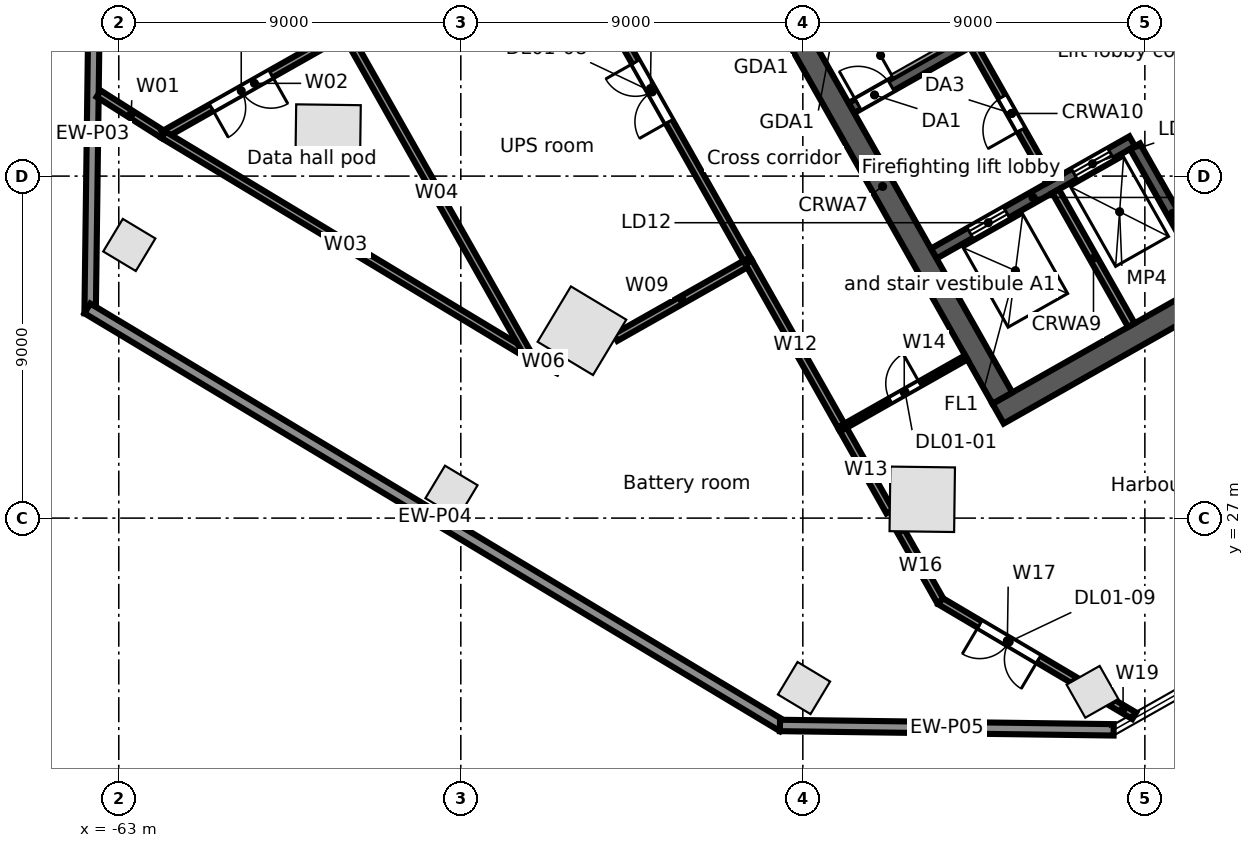
"""IFC4 building model, lengths in metres.
Left out: names, types, materials, properties, quantities, classifications, styles, units other than length and angle.
Written with IfcOpenShell. Run it as: python <this file> out.ifc"""

import sys

from ifc_helpers import new_model, si_unit, direction, frame, frame_2d, origin, origin_2d, place, context, subcontext, project, spatial, rectangle, extrude, element, fill, save


model = new_model("IFC4")
c1 = context("Model", 3, precision=1e-05, world=origin(), true_north=direction((0.0, 1.0)))
c2 = subcontext(c1, "Body", "Model", "MODEL_VIEW")
j1 = project(units=[si_unit("LENGTHUNIT", "METRE"), si_unit("PLANEANGLEUNIT", "RADIAN")], contexts=[c1])
p1 = place(None, origin())
s1 = spatial("IfcSite", under=j1, at=p1, CompositionType="ELEMENT")
p2 = place(p1, origin())
s2 = spatial("IfcBuilding", under=s1, at=p2, CompositionType="ELEMENT")
p3 = place(p2, frame((0.0, 0.0, 6.5)))
s3 = spatial("IfcBuildingStorey", under=s2, at=p3, CompositionType="ELEMENT", Elevation=6.5)
for number, where, z_axis, x_axis in (
    (1, (-57.493, 37.027, 0.0), (0.0, 0.0, 1.0), (-0.013, -1.0, 0.0)),
    (2, (-50.812, 31.931, 0.0), (0.0, 0.0, 1.0), (0.857, -0.515, 0.0)),
    (3, (-41.858, 27.495, 0.0), (0.0, 0.0, 1.0), (1.0, -0.013, 0.0)),
):
    element("IfcColumn", number, at=place(p3, frame(where, z_axis=z_axis, x_axis=x_axis)), inside=s3, PredefinedType="COLUMN", context=c2, shape_type="SweptSolid", body=[
        extrude(rectangle(XDim=1.7, YDim=1.7, at=origin_2d()), origin(), (0.0, 0.0, 1.0), 5.0),
    ])
for number, where, z_axis, x_axis in (
    (4, (-62.723, 34.188, 0.0), (0.0, 0.0, 1.0), (0.857, -0.515, 0.0)),
    (5, (-54.245, 27.694, 0.0), (0.0, 0.0, 1.0), (0.857, -0.515, 0.0)),
    (6, (-44.969, 22.528, 0.0), (0.0, 0.0, 1.0), (0.857, -0.515, 0.0)),
    (7, (-37.378, 22.429, 0.0), (0.0, 0.0, 1.0), (0.87, 0.492, 0.0)),
):
    element("IfcColumn", number, at=place(p3, frame(where, z_axis=z_axis, x_axis=x_axis)), inside=s3, PredefinedType="COLUMN", context=c2, shape_type="SweptSolid", body=[
        extrude(rectangle(XDim=1.0, YDim=1.0, at=origin_2d()), origin(), (0.0, 0.0, 1.0), 5.0),
    ])
p4 = place(p3, frame((-63.754, 32.387, 0.0), z_axis=(0.0, 0.0, 1.0), x_axis=(0.013081929375, 0.999914427901, 0.0)))
e8 = element("IfcWall", 8, at=p4, inside=s3, PredefinedType="STANDARD", context=c2, shape_type="SweptSolid", body=[
    extrude(rectangle(XDim=9.443, YDim=0.3, at=frame_2d((4.722, 0.0))), origin(), (0.0, 0.0, 1.0), 4.65),
])
p5 = place(p3, frame((-45.526, 21.522, 0.0), z_axis=(0.0, 0.0, 1.0), x_axis=(-0.857164837164, 0.515042174903, 0.0)))
e9 = element("IfcWall", 9, at=p5, inside=s3, PredefinedType="STANDARD", context=c2, shape_type="SweptSolid", body=[
    extrude(rectangle(XDim=21.35, YDim=0.3, at=frame_2d((10.675, 0.0))), origin(), (0.0, 0.0, 1.0), 4.65),
])
p6 = place(p3, frame((-36.821, 21.428, 0.0), z_axis=(0.0, 0.0, 1.0), x_axis=(-0.999914252794, 0.013095306781, 0.0)))
e10 = element("IfcWall", 10, at=p6, inside=s3, PredefinedType="STANDARD", context=c2, shape_type="SweptSolid", body=[
    extrude(rectangle(XDim=8.781, YDim=0.3, at=frame_2d((4.391, 0.0))), origin(), (0.0, 0.0, 1.0), 4.65),
])
p7 = place(p3, frame((-39.862, 29.749, 0.0), z_axis=(0.0, 0.0, 1.0), x_axis=(0.870350116061, 0.492433422375, 0.0)))
e11 = element("IfcWall", 11, at=p7, inside=s3, PredefinedType="SOLIDWALL", context=c2, shape_type="SweptSolid", body=[
    extrude(rectangle(XDim=17.0, YDim=0.6, at=frame_2d((8.5, 0.0))), origin(), (0.0, 0.0, 1.0), 4.65),
])
p8 = place(p7, frame((7.2, 0.0, 0.0)))
e12 = element("IfcOpeningElement", 12, at=p8, cuts=e11, PredefinedType="OPENING", context=c2, shape_type="SweptSolid", body=[
    extrude(rectangle(XDim=1.2, YDim=2.1, at=frame_2d((0.6, 1.05))), frame((0.0, 0.31, 0.0), z_axis=(0.0, -1.0, 0.0), x_axis=(1.0, 0.0, 0.0)), (0.0, 0.0, 1.0), 0.62),
])
p9 = place(p3, frame((-41.556, 33.961, 0.0), z_axis=(0.0, 0.0, 1.0), x_axis=(0.870343731308, 0.492444706919, 0.0)))
e13 = element("IfcWall", 13, at=p9, inside=s3, PredefinedType="SOLIDWALL", context=c2, shape_type="SweptSolid", body=[
    extrude(rectangle(XDim=6.0, YDim=0.3, at=frame_2d((3.0, 0.0))), origin(), (0.0, 0.0, 1.0), 4.65),
])
p10 = place(p9, frame((1.1, 0.0, 0.0)))
e14 = element("IfcOpeningElement", 14, at=p10, cuts=e13, PredefinedType="OPENING", context=c2, shape_type="SweptSolid", body=[
    extrude(rectangle(XDim=1.1, YDim=2.1, at=frame_2d((0.55, 1.05))), frame((0.0, 0.16, 0.0), z_axis=(0.0, -1.0, 0.0), x_axis=(1.0, 0.0, 0.0)), (0.0, 0.0, 1.0), 0.32),
])
p11 = place(p9, frame((4.25, 0.0, 0.0)))
e15 = element("IfcOpeningElement", 15, at=p11, cuts=e13, PredefinedType="OPENING", context=c2, shape_type="SweptSolid", body=[
    extrude(rectangle(XDim=1.1, YDim=2.1, at=frame_2d((0.55, 1.05))), frame((0.0, 0.16, 0.0), z_axis=(0.0, -1.0, 0.0), x_axis=(1.0, 0.0, 0.0)), (0.0, 0.0, 1.0), 0.32),
])
p12 = place(p3, frame((-43.723, 37.791, 0.0), z_axis=(0.0, 0.0, 1.0), x_axis=(0.87035077051, 0.49243226567, 0.0)))
e16 = element("IfcWall", 16, at=p12, inside=s3, PredefinedType="SOLIDWALL", context=c2, shape_type="SweptSolid", body=[
    extrude(rectangle(XDim=7.4, YDim=0.3, at=frame_2d((3.7, 0.0))), origin(), (0.0, 0.0, 1.0), 4.65),
])
p13 = place(p12, frame((0.2, 0.0, 0.0)))
e17 = element("IfcOpeningElement", 17, at=p13, cuts=e16, PredefinedType="OPENING", context=c2, shape_type="SweptSolid", body=[
    extrude(rectangle(XDim=1.0, YDim=2.1, at=frame_2d((0.5, 1.05))), frame((0.0, 0.16, 0.0), z_axis=(0.0, -1.0, 0.0), x_axis=(1.0, 0.0, 0.0)), (0.0, 0.0, 1.0), 0.32),
])
p14 = place(p3, frame((-46.052, 41.298, 0.0), z_axis=(0.0, 0.0, 1.0), x_axis=(0.492418598281, -0.870358503186, 0.0)))
e18 = element("IfcWall", 18, at=p14, inside=s3, PredefinedType="SOLIDWALL", context=c2, shape_type="SweptSolid", body=[
    extrude(rectangle(XDim=12.8, YDim=0.6, at=frame_2d((6.4, 0.0))), origin(), (0.0, 0.0, 1.0), 4.65),
])
p15 = place(p3, frame((-38.349, 35.603, 0.0), z_axis=(0.0, 0.0, 1.0), x_axis=(0.49241474071, -0.870360685654, 0.0)))
e19 = element("IfcWall", 19, at=p15, inside=s3, PredefinedType="SOLIDWALL", context=c2, shape_type="SweptSolid", body=[
    extrude(rectangle(XDim=4.05, YDim=0.2, at=frame_2d((2.025, 0.0))), origin(), (0.0, 0.0, 1.0), 4.65),
])
p16 = place(p3, frame((-40.516, 39.433, 0.0), z_axis=(0.0, 0.0, 1.0), x_axis=(0.492453559952, -0.87033872216, 0.0)))
e20 = element("IfcWall", 20, at=p16, inside=s3, PredefinedType="PARTITIONING", context=c2, shape_type="SweptSolid", body=[
    extrude(rectangle(XDim=4.1, YDim=0.2, at=frame_2d((2.05, 0.0))), origin(), (0.0, 0.0, 1.0), 4.65),
])
p17 = place(p16, frame((1.55, 0.0, 0.0)))
e21 = element("IfcOpeningElement", 21, at=p17, cuts=e20, PredefinedType="OPENING", context=c2, shape_type="SweptSolid", body=[
    extrude(rectangle(XDim=1.0, YDim=2.1, at=frame_2d((0.5, 1.05))), frame((0.0, 0.11, 0.0), z_axis=(0.0, -1.0, 0.0), x_axis=(1.0, 0.0, 0.0)), (0.0, 0.0, 1.0), 0.22),
])
p18 = place(p3, frame((-36.26, 36.785, 0.0), z_axis=(0.0, 0.0, 1.0), x_axis=(0.492440575896, -0.870346068648, 0.0)))
e22 = element("IfcWall", 22, at=p18, inside=s3, PredefinedType="SOLIDWALL", context=c2, shape_type="SweptSolid", body=[
    extrude(rectangle(XDim=4.05, YDim=0.3, at=frame_2d((2.025, 0.0))), origin(), (0.0, 0.0, 1.0), 4.65),
])
p19 = place(p3, frame((-63.529, 38.167, 0.0), z_axis=(0.0, 0.0, 1.0), x_axis=(0.844913795328, -0.534902494352, 0.0)))
e23 = element("IfcWall", 23, at=p19, inside=s3, PredefinedType="PARTITIONING", context=c2, shape_type="SweptSolid", body=[
    extrude(rectangle(XDim=2.019, YDim=0.2, at=frame_2d((1.01, 0.0))), origin(), (0.0, 0.0, 1.0), 4.13),
])
p20 = place(p3, frame((-61.823, 37.087, 0.0), z_axis=(0.0, 0.0, 1.0), x_axis=(0.870387515286, 0.492367315359, 0.0)))
e24 = element("IfcWall", 24, at=p20, inside=s3, PredefinedType="PARTITIONING", context=c2, shape_type="SweptSolid", body=[
    extrude(rectangle(XDim=5.5, YDim=0.2, at=frame_2d((2.75, 0.0))), origin(), (0.0, 0.0, 1.0), 3.83),
])
p21 = place(p20, frame((1.45, 0.0, 0.0)))
e25 = element("IfcOpeningElement", 25, at=p21, cuts=e24, PredefinedType="OPENING", context=c2, shape_type="SweptSolid", body=[
    extrude(rectangle(XDim=1.8, YDim=2.1, at=frame_2d((0.9, 1.05))), frame((0.0, 0.11, 0.0), z_axis=(0.0, -1.0, 0.0), x_axis=(1.0, 0.0, 0.0)), (0.0, 0.0, 1.0), 0.22),
])
p22 = place(p3, frame((-61.823, 37.087, 0.0), z_axis=(0.0, 0.0, 1.0), x_axis=(0.85653126321, -0.516095141562, 0.0)))
e26 = element("IfcWall", 26, at=p22, inside=s3, PredefinedType="PARTITIONING", context=c2, shape_type="SweptSolid", body=[
    extrude(rectangle(XDim=11.195, YDim=0.2, at=frame_2d((5.598, 0.0))), origin(), (0.0, 0.0, 1.0), 3.822),
])
p23 = place(p3, frame((-57.036, 39.795, 0.0), z_axis=(0.0, 0.0, 1.0), x_axis=(0.492496959124, -0.870314164687, 0.0)))
e27 = element("IfcWall", 27, at=p23, inside=s3, PredefinedType="PARTITIONING", context=c2, shape_type="SweptSolid", body=[
    extrude(rectangle(XDim=9.75, YDim=0.2, at=frame_2d((4.875, 0.0))), origin(), (0.0, 0.0, 1.0), 3.822),
])
p24 = place(p3, frame((-52.234, 31.309, 0.0), z_axis=(0.0, 0.0, 1.0), x_axis=(0.89219447326, -0.451651438483, 0.0)))
e28 = element("IfcWall", 28, at=p24, inside=s3, PredefinedType="PARTITIONING", context=c2, shape_type="SweptSolid", body=[
    extrude(rectangle(XDim=0.901, YDim=0.2, at=frame_2d((0.451, 0.0))), origin(), (0.0, 0.0, 1.0), 3.712),
])
p25 = place(p3, frame((-51.596, 42.873, 0.0), z_axis=(0.0, 0.0, 1.0), x_axis=(0.492438738815, -0.870347108064, 0.0)))
e29 = element("IfcWall", 29, at=p25, inside=s3, PredefinedType="PARTITIONING", context=c2, shape_type="SweptSolid", body=[
    extrude(rectangle(XDim=10.5, YDim=0.2, at=frame_2d((5.25, 0.0))), origin(), (0.0, 0.0, 1.0), 3.712),
])
p26 = place(p25, frame((4.45, 0.0, 0.0)))
e30 = element("IfcOpeningElement", 30, at=p26, cuts=e29, PredefinedType="OPENING", context=c2, shape_type="SweptSolid", body=[
    extrude(rectangle(XDim=1.8, YDim=2.1, at=frame_2d((0.9, 1.05))), frame((0.0, 0.11, 0.0), z_axis=(0.0, -1.0, 0.0), x_axis=(1.0, 0.0, 0.0)), (0.0, 0.0, 1.0), 0.22),
])
p27 = place(p3, frame((-49.928, 31.752, 0.0), z_axis=(0.0, 0.0, 1.0), x_axis=(0.870348099826, 0.492436985948, 0.0)))
e31 = element("IfcWall", 31, at=p27, inside=s3, PredefinedType="PARTITIONING", context=c2, shape_type="SweptSolid", body=[
    extrude(rectangle(XDim=4.025, YDim=0.2, at=frame_2d((2.012, 0.0))), origin(), (0.0, 0.0, 1.0), 4.65),
])
p28 = place(p3, frame((-46.425, 33.734, 0.0), z_axis=(0.0, 0.0, 1.0), x_axis=(0.492427267353, -0.870353598469, 0.0)))
e32 = element("IfcWall", 32, at=p28, inside=s3, PredefinedType="PARTITIONING", context=c2, shape_type="SweptSolid", body=[
    extrude(rectangle(XDim=5.0, YDim=0.2, at=frame_2d((2.5, 0.0))), origin(), (0.0, 0.0, 1.0), 4.65),
])
p29 = place(p3, frame((-43.963, 29.382, 0.0), z_axis=(0.0, 0.0, 1.0), x_axis=(0.492408705769, -0.870364099951, 0.0)))
e33 = element("IfcWall", 33, at=p29, inside=s3, PredefinedType="PARTITIONING", context=c2, shape_type="SweptSolid", body=[
    extrude(rectangle(XDim=2.541, YDim=0.2, at=frame_2d((1.27, 0.0))), origin(), (0.0, 0.0, 1.0), 3.93),
])
p30 = place(p3, frame((-43.963, 29.382, 0.0), z_axis=(0.0, 0.0, 1.0), x_axis=(0.870259488443, 0.492593567533, 0.0)))
e34 = element("IfcWall", 34, at=p30, inside=s3, PredefinedType="PARTITIONING", context=c2, shape_type="SweptSolid", body=[
    extrude(rectangle(XDim=3.749, YDim=0.125, at=frame_2d((1.875, 0.0))), origin(), (0.0, 0.0, 1.0), 4.024),
])
p31 = place(p30, frame((1.45, 0.0, 0.0)))
e35 = element("IfcOpeningElement", 35, at=p31, cuts=e34, PredefinedType="OPENING", context=c2, shape_type="SweptSolid", body=[
    extrude(rectangle(XDim=0.9, YDim=2.1, at=frame_2d((0.45, 1.05))), frame((0.0, 0.073, 0.0), z_axis=(0.0, -1.0, 0.0), x_axis=(1.0, 0.0, 0.0)), (0.0, 0.0, 1.0), 0.145),
])
p32 = place(p3, frame((-42.418, 26.652, 0.0), z_axis=(0.0, 0.0, 1.0), x_axis=(0.492251431349, -0.870453059237, 0.0)))
e36 = element("IfcWall", 36, at=p32, inside=s3, PredefinedType="PARTITIONING", context=c2, shape_type="SweptSolid", body=[
    extrude(rectangle(XDim=2.113, YDim=0.2, at=frame_2d((1.056, 0.0))), origin(), (0.0, 0.0, 1.0), 4.65),
])
p33 = place(p3, frame((-41.378, 24.813, 0.0), z_axis=(0.0, 0.0, 1.0), x_axis=(0.860752907168, -0.509023017948, 0.0)))
e37 = element("IfcWall", 37, at=p33, inside=s3, PredefinedType="PARTITIONING", context=c2, shape_type="SweptSolid", body=[
    extrude(rectangle(XDim=4.088, YDim=0.2, at=frame_2d((2.044, 0.0))), origin(), (0.0, 0.0, 1.0), 4.65),
])
p34 = place(p33, frame((1.2, 0.0, 0.0)))
e38 = element("IfcOpeningElement", 38, at=p34, cuts=e37, PredefinedType="OPENING", context=c2, shape_type="SweptSolid", body=[
    extrude(rectangle(XDim=1.8, YDim=2.1, at=frame_2d((0.9, 1.05))), frame((0.0, 0.11, 0.0), z_axis=(0.0, -1.0, 0.0), x_axis=(1.0, 0.0, 0.0)), (0.0, 0.0, 1.0), 0.22),
])
p35 = place(p3, frame((-36.866, 22.144, 0.0), z_axis=(0.0, 0.0, 1.0), x_axis=(0.861112187998, -0.508414987664, 0.0)))
e39 = element("IfcWall", 39, at=p35, inside=s3, PredefinedType="PARTITIONING", context=c2, shape_type="SweptSolid", body=[
    extrude(rectangle(XDim=0.68, YDim=0.2, at=frame_2d((0.34, 0.0))), origin(), (0.0, 0.0, 1.0), 4.65),
])
p36 = place(p10, origin())
e40 = element("IfcDoor", 40, at=p36, inside=s3, OperationType="DOUBLE_DOOR_SLIDING", PredefinedType="DOOR", context=c2, shape_type="SweptSolid", body=[
    extrude(rectangle(XDim=1.1, YDim=2.1, at=frame_2d((0.55, 1.05))), frame((0.0, 0.025, 0.0), z_axis=(0.0, -1.0, 0.0), x_axis=(1.0, 0.0, 0.0)), (0.0, 0.0, 1.0), 0.05),
])
fill(e14, e40)
p37 = place(p11, origin())
e41 = element("IfcDoor", 41, at=p37, inside=s3, OperationType="DOUBLE_DOOR_SLIDING", PredefinedType="DOOR", context=c2, shape_type="SweptSolid", body=[
    extrude(rectangle(XDim=1.1, YDim=2.1, at=frame_2d((0.55, 1.05))), frame((0.0, 0.025, 0.0), z_axis=(0.0, -1.0, 0.0), x_axis=(1.0, 0.0, 0.0)), (0.0, 0.0, 1.0), 0.05),
])
fill(e15, e41)
p38 = place(p13, origin())
e42 = element("IfcDoor", 42, at=p38, inside=s3, OperationType="SINGLE_SWING_LEFT", PredefinedType="DOOR", context=c2, shape_type="SweptSolid", body=[
    extrude(rectangle(XDim=1.0, YDim=2.1, at=frame_2d((0.5, 1.05))), frame((0.0, 0.025, 0.0), z_axis=(0.0, -1.0, 0.0), x_axis=(1.0, 0.0, 0.0)), (0.0, 0.0, 1.0), 0.05),
])
fill(e17, e42)
p39 = place(p17, frame((1.0, 0.0, 0.0), z_axis=(0.0, 0.0, 1.0), x_axis=(-1.0, 0.0, 0.0)))
e43 = element("IfcDoor", 43, at=p39, inside=s3, OperationType="SINGLE_SWING_LEFT", PredefinedType="DOOR", context=c2, shape_type="SweptSolid", body=[
    extrude(rectangle(XDim=1.0, YDim=2.1, at=frame_2d((0.5, 1.05))), frame((0.0, 0.025, 0.0), z_axis=(0.0, -1.0, 0.0), x_axis=(1.0, 0.0, 0.0)), (0.0, 0.0, 1.0), 0.05),
])
fill(e21, e43)
p40 = place(p31, origin())
e44 = element("IfcDoor", 44, at=p40, inside=s3, OperationType="SINGLE_SWING_RIGHT", PredefinedType="DOOR", context=c2, shape_type="SweptSolid", body=[
    extrude(rectangle(XDim=0.9, YDim=2.1, at=frame_2d((0.45, 1.05))), frame((0.0, 0.025, 0.0), z_axis=(0.0, -1.0, 0.0), x_axis=(1.0, 0.0, 0.0)), (0.0, 0.0, 1.0), 0.05),
])
fill(e35, e44)
p41 = place(p21, frame((1.8, 0.0, 0.0), z_axis=(0.0, 0.0, 1.0), x_axis=(-1.0, 0.0, 0.0)))
e45 = element("IfcDoor", 45, at=p41, inside=s3, OperationType="DOUBLE_DOOR_SINGLE_SWING", PredefinedType="DOOR", context=c2, shape_type="SweptSolid", body=[
    extrude(rectangle(XDim=1.8, YDim=2.1, at=frame_2d((0.9, 1.05))), frame((0.0, 0.025, 0.0), z_axis=(0.0, -1.0, 0.0), x_axis=(1.0, 0.0, 0.0)), (0.0, 0.0, 1.0), 0.05),
])
fill(e25, e45)
p42 = place(p26, frame((1.8, 0.0, 0.0), z_axis=(0.0, 0.0, 1.0), x_axis=(-1.0, 0.0, 0.0)))
e46 = element("IfcDoor", 46, at=p42, inside=s3, OperationType="DOUBLE_DOOR_SINGLE_SWING", PredefinedType="DOOR", context=c2, shape_type="SweptSolid", body=[
    extrude(rectangle(XDim=1.8, YDim=2.1, at=frame_2d((0.9, 1.05))), frame((0.0, 0.025, 0.0), z_axis=(0.0, -1.0, 0.0), x_axis=(1.0, 0.0, 0.0)), (0.0, 0.0, 1.0), 0.05),
])
fill(e30, e46)
p43 = place(p34, frame((1.8, 0.0, 0.0), z_axis=(0.0, 0.0, 1.0), x_axis=(-1.0, 0.0, 0.0)))
e47 = element("IfcDoor", 47, at=p43, inside=s3, OperationType="DOUBLE_DOOR_SINGLE_SWING", PredefinedType="DOOR", context=c2, shape_type="SweptSolid", body=[
    extrude(rectangle(XDim=1.8, YDim=2.1, at=frame_2d((0.9, 1.05))), frame((0.0, 0.025, 0.0), z_axis=(0.0, -1.0, 0.0), x_axis=(1.0, 0.0, 0.0)), (0.0, 0.0, 1.0), 0.05),
])
fill(e38, e47)
save(model, sys.argv[1])
